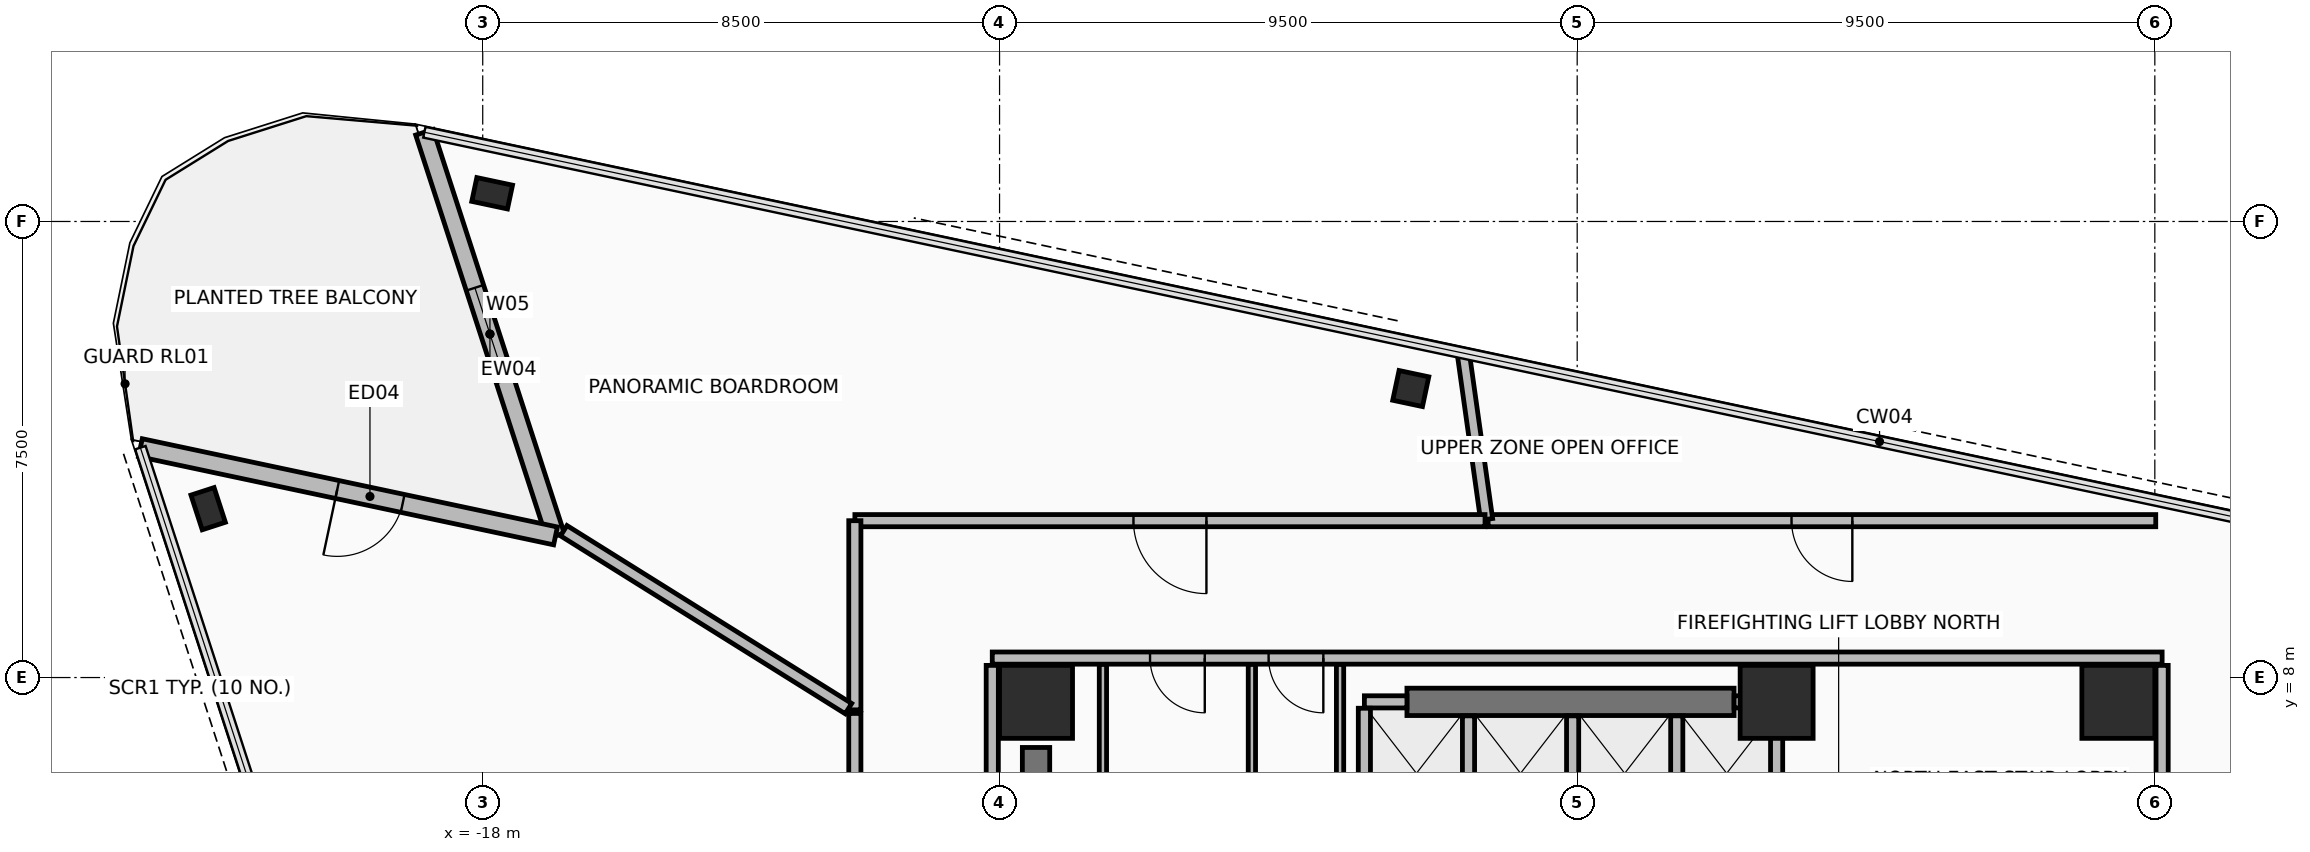
"""IFC4 building model, lengths in metres.
Left out: names, types, materials, properties, quantities, classifications, styles, units other than length and angle.
Written with IfcOpenShell. Run it as: python <this file> out.ifc"""

import sys

from ifc_helpers import new_model, si_unit, direction, frame, frame_2d, origin, origin_2d, place, context, subcontext, project, spatial, rectangle, hollow_rectangle, extrude, element, fill, save


model = new_model("IFC4")
c1 = context("Model", 3, precision=1e-05, world=origin(), true_north=direction((0.0, 1.0)))
c2 = subcontext(c1, "Body", "Model", "MODEL_VIEW")
j1 = project(units=[si_unit("LENGTHUNIT", "METRE"), si_unit("PLANEANGLEUNIT", "RADIAN")], contexts=[c1])
p1 = place(None, origin())
s1 = spatial("IfcSite", under=j1, at=p1, CompositionType="ELEMENT")
p2 = place(p1, origin())
s2 = spatial("IfcBuilding", under=s1, at=p2, CompositionType="ELEMENT")
p3 = place(p2, frame((0.0, 0.0, 207.65)))
s3 = spatial("IfcBuildingStorey", under=s2, at=p3, CompositionType="ELEMENT", Elevation=207.65)
for number, where, z_axis, x_axis in (
    (1, (8.9, 7.6, 0.0), (0.0, 0.0, 1.0), (1.0, 0.0, 0.0)),
    (2, (3.28, 7.6, 0.0), (0.0, 0.0, 1.0), (1.0, 0.0, 0.0)),
    (3, (-8.9, 7.6, 0.0), (0.0, 0.0, 1.0), (1.0, 0.0, 0.0)),
):
    element("IfcColumn", number, at=place(p3, frame(where, z_axis=z_axis, x_axis=x_axis)), inside=s3, PredefinedType="COLUMN", context=c2, shape_type="SweptSolid", body=[
        extrude(rectangle(XDim=1.2, YDim=1.2, at=origin_2d()), origin(), (0.0, 0.0, 1.0), 3.6),
    ])
p4 = place(p3, frame((-22.515, 10.777, 0.0), z_axis=(0.0, 0.0, 1.0), x_axis=(-0.309016994375, 0.951056516295, 0.0)))
e4 = element("IfcColumn", 4, at=p4, inside=s3, PredefinedType="COLUMN", context=c2, shape_type="SweptSolid", body=[
    extrude(hollow_rectangle(XDim=0.4, YDim=0.6, WallThickness=0.03, at=origin_2d()), origin(), (0.0, 0.0, 1.0), 3.6),
])
p5 = place(p3, frame((-2.737, 12.753, 0.0), z_axis=(0.0, 0.0, 1.0), x_axis=(-0.978147600734, 0.207911690818, 0.0)))
e5 = element("IfcColumn", 5, at=p5, inside=s3, PredefinedType="COLUMN", context=c2, shape_type="SweptSolid", body=[
    extrude(hollow_rectangle(XDim=0.5, YDim=0.5, WallThickness=0.032, at=origin_2d()), origin(), (0.0, 0.0, 1.0), 3.6),
])
p6 = place(p3, frame((-17.845, 15.964, 0.0), z_axis=(0.0, 0.0, 1.0), x_axis=(-0.978147600734, 0.207911690818, 0.0)))
e6 = element("IfcColumn", 6, at=p6, inside=s3, PredefinedType="COLUMN", context=c2, shape_type="SweptSolid", body=[
    extrude(hollow_rectangle(XDim=0.4, YDim=0.6, WallThickness=0.03, at=origin_2d()), origin(), (0.0, 0.0, 1.0), 3.6),
])
p7 = place(p3, frame((-18.96, 16.968, 0.0), z_axis=(0.0, 0.0, 1.0), x_axis=(0.309030708092, -0.951052060329, 0.0)))
e7 = element("IfcWall", 7, at=p7, inside=s3, PredefinedType="STANDARD", context=c2, shape_type="SweptSolid", body=[
    extrude(rectangle(XDim=6.98, YDim=0.3, at=frame_2d((3.49, 0.0))), origin(), (0.0, 0.0, 1.0), 2.715),
])
p8 = place(p7, frame((2.69, 0.0, 0.335)))
e8 = element("IfcOpeningElement", 8, at=p8, cuts=e7, PredefinedType="OPENING", context=c2, shape_type="SweptSolid", body=[
    extrude(rectangle(XDim=1.6, YDim=2.2, at=frame_2d((0.8, 1.1))), frame((0.0, 0.16, 0.0), z_axis=(0.0, -1.0, 0.0), x_axis=(1.0, 0.0, 0.0)), (0.0, 0.0, 1.0), 0.32),
])
p9 = place(p3, frame((-16.803, 10.329, 0.0), z_axis=(0.0, 0.0, 1.0), x_axis=(-0.9781486268, 0.207906863497, 0.0)))
e9 = element("IfcWall", 9, at=p9, inside=s3, PredefinedType="STANDARD", context=c2, shape_type="SweptSolid", body=[
    extrude(rectangle(XDim=6.98, YDim=0.3, at=frame_2d((3.49, 0.0))), origin(), (0.0, 0.0, 1.0), 2.715),
])
p10 = place(p9, frame((2.57, 0.0, 0.0)))
e10 = element("IfcOpeningElement", 10, at=p10, cuts=e9, PredefinedType="OPENING", context=c2, shape_type="SweptSolid", body=[
    extrude(rectangle(XDim=1.1, YDim=2.2, at=frame_2d((0.55, 1.1))), frame((0.0, 0.16, 0.0), z_axis=(0.0, -1.0, 0.0), x_axis=(1.0, 0.0, 0.0)), (0.0, 0.0, 1.0), 0.32),
])
p11 = place(p3, frame((-2.8, 7.6, 0.0), z_axis=(0.0, 0.0, 1.0), x_axis=(1.0, 0.0, 0.0)))
e11 = element("IfcWall", 11, at=p11, inside=s3, PredefinedType="SHEAR", context=c2, shape_type="SweptSolid", body=[
    extrude(rectangle(XDim=5.38, YDim=0.45, at=frame_2d((2.69, 0.0))), origin(), (0.0, 0.0, 1.0), 3.42),
])
p12 = place(p3, frame((-8.9, -3.85, 0.0), z_axis=(0.0, 0.0, 1.0), x_axis=(0.0, 1.0, 0.0)))
e12 = element("IfcWall", 12, at=p12, inside=s3, PredefinedType="SHEAR", context=c2, shape_type="SweptSolid", body=[
    extrude(rectangle(XDim=10.7, YDim=0.45, at=frame_2d((5.35, 0.0))), origin(), (0.0, 0.0, 1.0), 3.42),
])
p13 = place(p3, frame((9.62, 8.32, 0.0), z_axis=(0.0, 0.0, 1.0), x_axis=(-1.0, 0.0, 0.0)))
e13 = element("IfcWall", 13, at=p13, inside=s3, PredefinedType="PARTITIONING", context=c2, shape_type="SweptSolid", body=[
    extrude(rectangle(XDim=19.24, YDim=0.2, at=frame_2d((9.62, 0.0))), origin(), (0.0, 0.0, 1.0), 2.865),
])
p14 = place(p13, frame((15.745, 0.0, 0.0)))
e14 = element("IfcOpeningElement", 14, at=p14, cuts=e13, PredefinedType="OPENING", context=c2, shape_type="SweptSolid", body=[
    extrude(rectangle(XDim=0.9, YDim=2.1, at=frame_2d((0.45, 1.05))), frame((0.0, 0.11, 0.0), z_axis=(0.0, -1.0, 0.0), x_axis=(1.0, 0.0, 0.0)), (0.0, 0.0, 1.0), 0.22),
])
p15 = place(p13, frame((13.795, 0.0, 0.0)))
e15 = element("IfcOpeningElement", 15, at=p15, cuts=e13, PredefinedType="OPENING", context=c2, shape_type="SweptSolid", body=[
    extrude(rectangle(XDim=0.9, YDim=2.1, at=frame_2d((0.45, 1.05))), frame((0.0, 0.11, 0.0), z_axis=(0.0, -1.0, 0.0), x_axis=(1.0, 0.0, 0.0)), (0.0, 0.0, 1.0), 0.22),
])
p16 = place(p3, frame((-9.62, 8.2, 0.0), z_axis=(0.0, 0.0, 1.0), x_axis=(0.0, -1.0, 0.0)))
e16 = element("IfcWall", 16, at=p16, inside=s3, PredefinedType="PARTITIONING", context=c2, shape_type="SweptSolid", body=[
    extrude(rectangle(XDim=16.4, YDim=0.2, at=frame_2d((8.2, 0.0))), origin(), (0.0, 0.0, 1.0), 2.765),
])
p17 = place(p16, frame((12.65, 0.0, 0.0)))
e17 = element("IfcOpeningElement", 17, at=p17, cuts=e16, PredefinedType="OPENING", context=c2, shape_type="SweptSolid", body=[
    extrude(rectangle(XDim=1.1, YDim=2.15, at=frame_2d((0.55, 1.075))), frame((0.0, 0.11, 0.0), z_axis=(0.0, -1.0, 0.0), x_axis=(1.0, 0.0, 0.0)), (0.0, 0.0, 1.0), 0.22),
])
p18 = place(p3, frame((9.62, -8.2, 0.0), z_axis=(0.0, 0.0, 1.0), x_axis=(0.0, 1.0, 0.0)))
e18 = element("IfcWall", 18, at=p18, inside=s3, PredefinedType="PARTITIONING", context=c2, shape_type="SweptSolid", body=[
    extrude(rectangle(XDim=16.4, YDim=0.2, at=frame_2d((8.2, 0.0))), origin(), (0.0, 0.0, 1.0), 2.865),
])
p19 = place(p18, frame((12.65, 0.0, 0.0)))
e19 = element("IfcOpeningElement", 19, at=p19, cuts=e18, PredefinedType="OPENING", context=c2, shape_type="SweptSolid", body=[
    extrude(rectangle(XDim=1.1, YDim=2.15, at=frame_2d((0.55, 1.075))), frame((0.0, 0.11, 0.0), z_axis=(0.0, -1.0, 0.0), x_axis=(1.0, 0.0, 0.0)), (0.0, 0.0, 1.0), 0.22),
])
p20 = place(p3, frame((-3.5, 7.6, 0.0), z_axis=(0.0, 0.0, 1.0), x_axis=(1.0, 0.0, 0.0)))
e20 = element("IfcWall", 20, at=p20, inside=s3, PredefinedType="PARTITIONING", context=c2, shape_type="SweptSolid", body=[
    extrude(rectangle(XDim=0.7, YDim=0.2, at=frame_2d((0.35, 0.0))), origin(), (0.0, 0.0, 1.0), 2.715),
])
p21 = place(p3, frame((-3.5, 5.38, 0.0), z_axis=(0.0, 0.0, 1.0), x_axis=(0.0, 1.0, 0.0)))
e21 = element("IfcWall", 21, at=p21, inside=s3, PredefinedType="PARTITIONING", context=c2, shape_type="SweptSolid", body=[
    extrude(rectangle(XDim=2.115, YDim=0.2, at=frame_2d((1.058, 0.0))), origin(), (0.0, 0.0, 1.0), 2.715),
])
for number, where, z_axis, x_axis in (
    (22, (-1.788, 5.38, 0.0), (0.0, 0.0, 1.0), (0.0, 1.0, 0.0)),
    (23, (-0.075, 5.38, 0.0), (0.0, 0.0, 1.0), (0.0, 1.0, 0.0)),
    (24, (1.637, 5.38, 0.0), (0.0, 0.0, 1.0), (0.0, 1.0, 0.0)),
):
    element("IfcWall", number, at=place(p3, frame(where, z_axis=z_axis, x_axis=x_axis)), inside=s3, PredefinedType="PARTITIONING", context=c2, shape_type="SweptSolid", body=[
        extrude(rectangle(XDim=1.99, YDim=0.2, at=frame_2d((0.995, 0.0))), origin(), (0.0, 0.0, 1.0), 2.715),
    ])
p22 = place(p3, frame((2.58, 7.6, 0.0), z_axis=(0.0, 0.0, 1.0), x_axis=(1.0, 0.0, 0.0)))
e25 = element("IfcWall", 25, at=p22, inside=s3, PredefinedType="PARTITIONING", context=c2, shape_type="SweptSolid", body=[
    extrude(rectangle(XDim=0.7, YDim=0.2, at=frame_2d((0.35, 0.0))), origin(), (0.0, 0.0, 1.0), 2.715),
])
p23 = place(p3, frame((3.28, 5.38, 0.0), z_axis=(0.0, 0.0, 1.0), x_axis=(0.0, 1.0, 0.0)))
e26 = element("IfcWall", 26, at=p23, inside=s3, PredefinedType="PARTITIONING", context=c2, shape_type="SweptSolid", body=[
    extrude(rectangle(XDim=2.115, YDim=0.2, at=frame_2d((1.058, 0.0))), origin(), (0.0, 0.0, 1.0), 2.715),
])
for number, where, z_axis, x_axis in (
    (27, (-5.35, 4.765, 0.0), (0.0, 0.0, 1.0), (0.0, 1.0, 0.0)),
    (28, (-7.8, 8.215, 0.0), (0.0, 0.0, 1.0), (0.0, -1.0, 0.0)),
    (29, (-3.9, 4.765, 0.0), (0.0, 0.0, 1.0), (0.0, 1.0, 0.0)),
):
    element("IfcWall", number, at=place(p3, frame(where, z_axis=z_axis, x_axis=x_axis)), inside=s3, PredefinedType="PARTITIONING", context=c2, shape_type="SweptSolid", body=[
        extrude(rectangle(XDim=3.45, YDim=0.12, at=frame_2d((1.725, 0.0))), origin(), (0.0, 0.0, 1.0), 2.715),
    ])
p24 = place(p3, frame((9.515, 10.58, 0.0), z_axis=(0.0, 0.0, 1.0), x_axis=(-1.0, 0.0, 0.0)))
e30 = element("IfcWall", 30, at=p24, inside=s3, PredefinedType="PARTITIONING", context=c2, shape_type="SweptSolid", body=[
    extrude(rectangle(XDim=10.98, YDim=0.2, at=frame_2d((5.49, 0.0))), origin(), (0.0, 0.0, 1.0), 2.715),
])
p25 = place(p24, frame((4.99, 0.0, 0.0)))
e31 = element("IfcOpeningElement", 31, at=p25, cuts=e30, PredefinedType="OPENING", context=c2, shape_type="SweptSolid", body=[
    extrude(rectangle(XDim=1.0, YDim=2.15, at=frame_2d((0.5, 1.075))), frame((0.0, 0.11, 0.0), z_axis=(0.0, -1.0, 0.0), x_axis=(1.0, 0.0, 0.0)), (0.0, 0.0, 1.0), 0.22),
])
p26 = place(p3, frame((-1.49, 10.602, 0.0), z_axis=(0.0, 0.0, 1.0), x_axis=(-0.139168128583, 0.990268767551, 0.0)))
e32 = element("IfcWall", 32, at=p26, inside=s3, PredefinedType="PARTITIONING", context=c2, shape_type="SweptSolid", body=[
    extrude(rectangle(XDim=2.761, YDim=0.2, at=frame_2d((1.381, 0.0))), origin(), (0.0, 0.0, 1.0), 2.715),
])
p27 = place(p3, frame((-1.516, 10.58, 0.0), z_axis=(0.0, 0.0, 1.0), x_axis=(-1.0, 0.0, 0.0)))
e33 = element("IfcWall", 33, at=p27, inside=s3, PredefinedType="PARTITIONING", context=c2, shape_type="SweptSolid", body=[
    extrude(rectangle(XDim=10.364, YDim=0.2, at=frame_2d((5.182, 0.0))), origin(), (0.0, 0.0, 1.0), 2.865),
])
p28 = place(p27, frame((4.582, 0.0, 0.0)))
e34 = element("IfcOpeningElement", 34, at=p28, cuts=e33, PredefinedType="OPENING", context=c2, shape_type="SweptSolid", body=[
    extrude(rectangle(XDim=1.2, YDim=2.15, at=frame_2d((0.6, 1.075))), frame((0.0, 0.11, 0.0), z_axis=(0.0, -1.0, 0.0), x_axis=(1.0, 0.0, 0.0)), (0.0, 0.0, 1.0), 0.22),
])
p29 = place(p3, frame((-11.88, 10.579, 0.0), z_axis=(0.0, 0.0, 1.0), x_axis=(0.0, -1.0, 0.0)))
e35 = element("IfcWall", 35, at=p29, inside=s3, PredefinedType="PARTITIONING", context=c2, shape_type="SweptSolid", body=[
    extrude(rectangle(XDim=3.111, YDim=0.2, at=frame_2d((1.555, 0.0))), origin(), (0.0, 0.0, 1.0), 2.765),
])
p30 = place(p3, frame((-11.985, 7.489, 0.0), z_axis=(0.0, 0.0, 1.0), x_axis=(-0.848035563326, 0.529939320427, 0.0)))
e36 = element("IfcWall", 36, at=p30, inside=s3, PredefinedType="PARTITIONING", context=c2, shape_type="SweptSolid", body=[
    extrude(rectangle(XDim=5.521, YDim=0.2, at=frame_2d((2.761, 0.0))), origin(), (0.0, 0.0, 1.0), 2.865),
])
p31 = place(p3, frame((-11.88, 7.41, 0.0), z_axis=(0.0, 0.0, 1.0), x_axis=(0.0, -1.0, 0.0)))
e37 = element("IfcWall", 37, at=p31, inside=s3, PredefinedType="PARTITIONING", context=c2, shape_type="SweptSolid", body=[
    extrude(rectangle(XDim=11.251, YDim=0.2, at=frame_2d((5.626, 0.0))), origin(), (0.0, 0.0, 1.0), 3.42),
])
p32 = place(p31, frame((5.126, 0.0, 0.0)))
e38 = element("IfcOpeningElement", 38, at=p32, cuts=e37, PredefinedType="OPENING", context=c2, shape_type="SweptSolid", body=[
    extrude(rectangle(XDim=1.0, YDim=2.15, at=frame_2d((0.5, 1.075))), frame((0.0, 0.11, 0.0), z_axis=(0.0, -1.0, 0.0), x_axis=(1.0, 0.0, 0.0)), (0.0, 0.0, 1.0), 0.22),
])
p33 = place(p10, frame((1.1, 0.0, 0.0), z_axis=(0.0, 0.0, 1.0), x_axis=(-1.0, 0.0, 0.0)))
e39 = element("IfcDoor", 39, at=p33, inside=s3, OperationType="SINGLE_SWING_LEFT", PredefinedType="DOOR", context=c2, shape_type="SweptSolid", body=[
    extrude(rectangle(XDim=1.1, YDim=2.2, at=frame_2d((0.55, 1.1))), frame((0.0, 0.025, 0.0), z_axis=(0.0, -1.0, 0.0), x_axis=(1.0, 0.0, 0.0)), (0.0, 0.0, 1.0), 0.05),
])
fill(e10, e39)
p34 = place(p8, origin())
e40 = element("IfcWindow", 40, at=p34, inside=s3, PartitioningType="SINGLE_PANEL", PredefinedType="WINDOW", context=c2, shape_type="SweptSolid", body=[
    extrude(rectangle(XDim=1.6, YDim=2.2, at=frame_2d((0.8, 1.1))), frame((0.0, 0.03, 0.0), z_axis=(0.0, -1.0, 0.0), x_axis=(1.0, 0.0, 0.0)), (0.0, 0.0, 1.0), 0.06),
])
fill(e8, e40)
p35 = place(p14, origin())
e41 = element("IfcDoor", 41, at=p35, inside=s3, OperationType="SINGLE_SWING_LEFT", PredefinedType="DOOR", context=c2, shape_type="SweptSolid", body=[
    extrude(rectangle(XDim=0.9, YDim=2.1, at=frame_2d((0.45, 1.05))), frame((0.0, 0.025, 0.0), z_axis=(0.0, -1.0, 0.0), x_axis=(1.0, 0.0, 0.0)), (0.0, 0.0, 1.0), 0.05),
])
fill(e14, e41)
p36 = place(p15, origin())
e42 = element("IfcDoor", 42, at=p36, inside=s3, OperationType="SINGLE_SWING_LEFT", PredefinedType="DOOR", context=c2, shape_type="SweptSolid", body=[
    extrude(rectangle(XDim=0.9, YDim=2.1, at=frame_2d((0.45, 1.05))), frame((0.0, 0.025, 0.0), z_axis=(0.0, -1.0, 0.0), x_axis=(1.0, 0.0, 0.0)), (0.0, 0.0, 1.0), 0.05),
])
fill(e15, e42)
p37 = place(p25, origin())
e43 = element("IfcDoor", 43, at=p37, inside=s3, OperationType="SINGLE_SWING_RIGHT", PredefinedType="DOOR", context=c2, shape_type="SweptSolid", body=[
    extrude(rectangle(XDim=1.0, YDim=2.15, at=frame_2d((0.5, 1.075))), frame((0.0, 0.025, 0.0), z_axis=(0.0, -1.0, 0.0), x_axis=(1.0, 0.0, 0.0)), (0.0, 0.0, 1.0), 0.05),
])
fill(e31, e43)
p38 = place(p28, origin())
e44 = element("IfcDoor", 44, at=p38, inside=s3, OperationType="SINGLE_SWING_LEFT", PredefinedType="DOOR", context=c2, shape_type="SweptSolid", body=[
    extrude(rectangle(XDim=1.2, YDim=2.15, at=frame_2d((0.6, 1.075))), frame((0.0, 0.025, 0.0), z_axis=(0.0, -1.0, 0.0), x_axis=(1.0, 0.0, 0.0)), (0.0, 0.0, 1.0), 0.05),
])
fill(e34, e44)
save(model, sys.argv[1])
